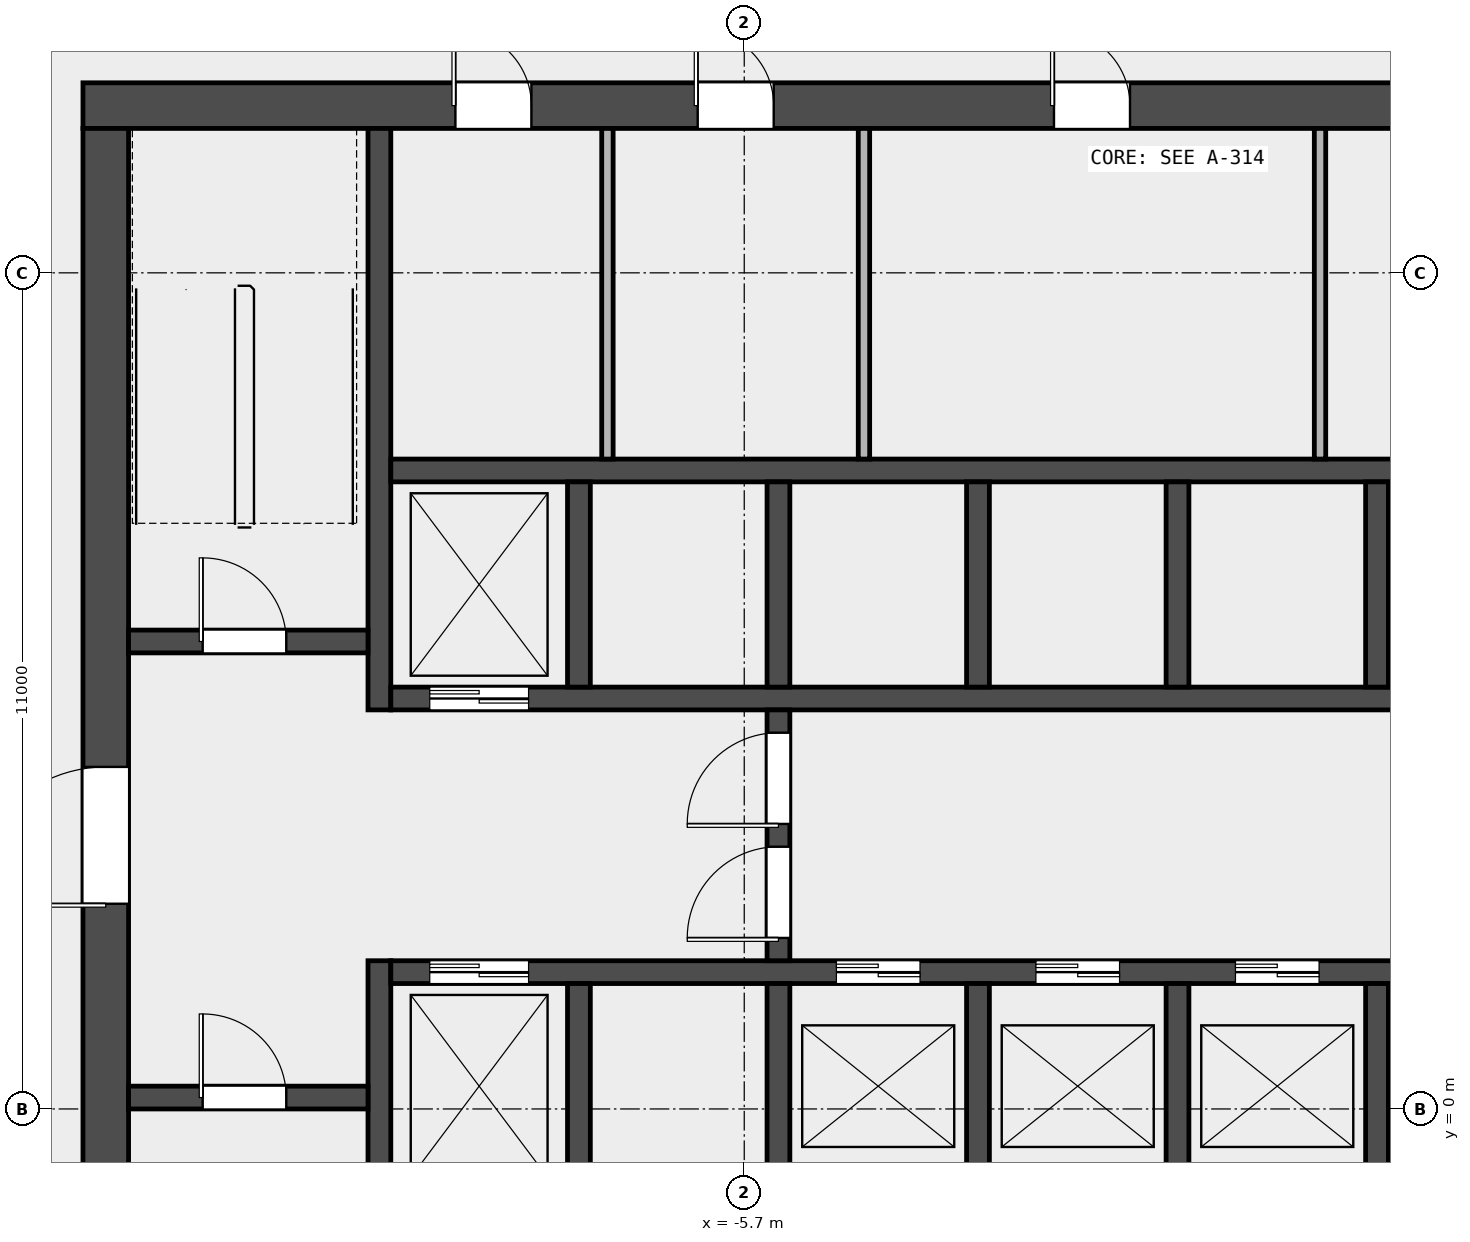
"""IFC4 building model, lengths in metres.
Left out: names, types, materials, properties, quantities, classifications, styles, units other than length and angle.
Written with IfcOpenShell. Run it as: python <this file> out.ifc"""

import sys

from ifc_helpers import new_model, si_unit, direction, frame, frame_2d, origin, place, context, subcontext, project, spatial, rectangle, extrude, element, fill, save


model = new_model("IFC4")
c1 = context("Model", 3, precision=1e-05, world=origin(), true_north=direction((0.0, 1.0)))
c2 = subcontext(c1, "Body", "Model", "MODEL_VIEW")
j1 = project(units=[si_unit("LENGTHUNIT", "METRE"), si_unit("PLANEANGLEUNIT", "RADIAN")], contexts=[c1])
p1 = place(None, origin())
s1 = spatial("IfcSite", under=j1, at=p1, CompositionType="ELEMENT")
p2 = place(p1, origin())
s2 = spatial("IfcBuilding", under=s1, at=p2, CompositionType="ELEMENT")
p3 = place(p2, frame((0.0, 0.0, 157.0)))
s3 = spatial("IfcBuildingStorey", under=s2, at=p3, CompositionType="ELEMENT", Elevation=157.0)
p4 = place(p3, frame((-14.4, 13.2, 0.0), z_axis=(0.0, 0.0, 1.0), x_axis=(1.0, 0.0, 0.0)))
e1 = element("IfcWall", 1, at=p4, inside=s3, PredefinedType="SHEAR", context=c2, shape_type="SweptSolid", body=[
    extrude(rectangle(XDim=28.8, YDim=0.6, at=frame_2d((14.4, 0.0))), origin(), (0.0, 0.0, 1.0), 3.7),
])
p5 = place(p4, frame((4.9, 0.0, 0.0)))
e2 = element("IfcOpeningElement", 2, at=p5, cuts=e1, PredefinedType="OPENING", context=c2, shape_type="SweptSolid", body=[
    extrude(rectangle(XDim=1.0, YDim=2.1, at=frame_2d((0.5, 1.05))), frame((0.0, 0.312, 0.0), z_axis=(0.0, -1.0, 0.0), x_axis=(1.0, 0.0, 0.0)), (0.0, 0.0, 1.0), 0.624),
])
p6 = place(p4, frame((8.087, 0.0, 0.0)))
e3 = element("IfcOpeningElement", 3, at=p6, cuts=e1, PredefinedType="OPENING", context=c2, shape_type="SweptSolid", body=[
    extrude(rectangle(XDim=1.0, YDim=2.1, at=frame_2d((0.5, 1.05))), frame((0.0, 0.312, 0.0), z_axis=(0.0, -1.0, 0.0), x_axis=(1.0, 0.0, 0.0)), (0.0, 0.0, 1.0), 0.624),
])
p7 = place(p4, frame((12.775, 0.0, 0.0)))
e4 = element("IfcOpeningElement", 4, at=p7, cuts=e1, PredefinedType="OPENING", context=c2, shape_type="SweptSolid", body=[
    extrude(rectangle(XDim=1.0, YDim=2.1, at=frame_2d((0.5, 1.05))), frame((0.0, 0.312, 0.0), z_axis=(0.0, -1.0, 0.0), x_axis=(1.0, 0.0, 0.0)), (0.0, 0.0, 1.0), 0.624),
])
p8 = place(p4, frame((17.65, 0.0, 0.0)))
e5 = element("IfcOpeningElement", 5, at=p8, cuts=e1, PredefinedType="OPENING", context=c2, shape_type="SweptSolid", body=[
    extrude(rectangle(XDim=1.0, YDim=2.1, at=frame_2d((0.5, 1.05))), frame((0.0, 0.312, 0.0), z_axis=(0.0, -1.0, 0.0), x_axis=(1.0, 0.0, 0.0)), (0.0, 0.0, 1.0), 0.624),
])
p9 = place(p4, frame((21.962, 0.0, 0.0)))
e6 = element("IfcOpeningElement", 6, at=p9, cuts=e1, PredefinedType="OPENING", context=c2, shape_type="SweptSolid", body=[
    extrude(rectangle(XDim=1.0, YDim=2.1, at=frame_2d((0.5, 1.05))), frame((0.0, 0.312, 0.0), z_axis=(0.0, -1.0, 0.0), x_axis=(1.0, 0.0, 0.0)), (0.0, 0.0, 1.0), 0.624),
])
p10 = place(p3, frame((-14.1, -6.6, 0.0), z_axis=(0.0, 0.0, 1.0), x_axis=(0.0, 1.0, 0.0)))
e7 = element("IfcWall", 7, at=p10, inside=s3, PredefinedType="SHEAR", context=c2, shape_type="SweptSolid", body=[
    extrude(rectangle(XDim=19.5, YDim=0.6, at=frame_2d((9.75, 0.0))), origin(), (0.0, 0.0, 1.0), 3.7),
])
p11 = place(p10, frame((9.3, 0.0, 0.0)))
e8 = element("IfcOpeningElement", 8, at=p11, cuts=e7, PredefinedType="OPENING", context=c2, shape_type="SweptSolid", body=[
    extrude(rectangle(XDim=1.8, YDim=2.1, at=frame_2d((0.9, 1.05))), frame((0.0, 0.312, 0.0), z_axis=(0.0, -1.0, 0.0), x_axis=(1.0, 0.0, 0.0)), (0.0, 0.0, 1.0), 0.624),
])
p12 = place(p3, frame((-10.5, -6.6, 0.0), z_axis=(0.0, 0.0, 1.0), x_axis=(0.0, 1.0, 0.0)))
e9 = element("IfcWall", 9, at=p12, inside=s3, PredefinedType="SHEAR", context=c2, shape_type="SweptSolid", body=[
    extrude(rectangle(XDim=8.55, YDim=0.3, at=frame_2d((4.275, 0.0))), origin(), (0.0, 0.0, 1.0), 3.7),
])
p13 = place(p3, frame((-10.5, 5.25, 0.0), z_axis=(0.0, 0.0, 1.0), x_axis=(0.0, 1.0, 0.0)))
e10 = element("IfcWall", 10, at=p13, inside=s3, PredefinedType="SHEAR", context=c2, shape_type="SweptSolid", body=[
    extrude(rectangle(XDim=7.65, YDim=0.3, at=frame_2d((3.825, 0.0))), origin(), (0.0, 0.0, 1.0), 3.7),
])
p14 = place(p3, frame((-13.8, 0.15, 0.0), z_axis=(0.0, 0.0, 1.0), x_axis=(1.0, 0.0, 0.0)))
e11 = element("IfcWall", 11, at=p14, inside=s3, PredefinedType="SOLIDWALL", context=c2, shape_type="SweptSolid", body=[
    extrude(rectangle(XDim=3.15, YDim=0.3, at=frame_2d((1.575, 0.0))), origin(), (0.0, 0.0, 1.0), 3.7),
])
p15 = place(p14, frame((0.975, 0.0, 0.0)))
e12 = element("IfcOpeningElement", 12, at=p15, cuts=e11, PredefinedType="OPENING", context=c2, shape_type="SweptSolid", body=[
    extrude(rectangle(XDim=1.1, YDim=2.1, at=frame_2d((0.55, 1.05))), frame((0.0, 0.162, 0.0), z_axis=(0.0, -1.0, 0.0), x_axis=(1.0, 0.0, 0.0)), (0.0, 0.0, 1.0), 0.324),
])
p16 = place(p3, frame((-13.8, 6.15, 0.0), z_axis=(0.0, 0.0, 1.0), x_axis=(1.0, 0.0, 0.0)))
e13 = element("IfcWall", 13, at=p16, inside=s3, PredefinedType="SOLIDWALL", context=c2, shape_type="SweptSolid", body=[
    extrude(rectangle(XDim=3.15, YDim=0.3, at=frame_2d((1.575, 0.0))), origin(), (0.0, 0.0, 1.0), 3.7),
])
p17 = place(p16, frame((0.975, 0.0, 0.0)))
e14 = element("IfcOpeningElement", 14, at=p17, cuts=e13, PredefinedType="OPENING", context=c2, shape_type="SweptSolid", body=[
    extrude(rectangle(XDim=1.1, YDim=2.1, at=frame_2d((0.55, 1.05))), frame((0.0, 0.162, 0.0), z_axis=(0.0, -1.0, 0.0), x_axis=(1.0, 0.0, 0.0)), (0.0, 0.0, 1.0), 0.324),
])
p18 = place(p3, frame((-10.35, 1.8, 0.0), z_axis=(0.0, 0.0, 1.0), x_axis=(1.0, 0.0, 0.0)))
e15 = element("IfcWall", 15, at=p18, inside=s3, PredefinedType="SOLIDWALL", context=c2, shape_type="SweptSolid", body=[
    extrude(rectangle(XDim=20.7, YDim=0.3, at=frame_2d((10.35, 0.0))), origin(), (0.0, 0.0, 1.0), 3.7),
])
p19 = place(p18, frame((0.512, 0.0, 0.0)))
e16 = element("IfcOpeningElement", 16, at=p19, cuts=e15, PredefinedType="OPENING", context=c2, shape_type="SweptSolid", body=[
    extrude(rectangle(XDim=1.3, YDim=2.1, at=frame_2d((0.65, 1.05))), frame((0.0, 0.162, 0.0), z_axis=(0.0, -1.0, 0.0), x_axis=(1.0, 0.0, 0.0)), (0.0, 0.0, 1.0), 0.324),
])
p20 = place(p18, frame((5.863, 0.0, 0.0)))
e17 = element("IfcOpeningElement", 17, at=p20, cuts=e15, PredefinedType="OPENING", context=c2, shape_type="SweptSolid", body=[
    extrude(rectangle(XDim=1.1, YDim=2.1, at=frame_2d((0.55, 1.05))), frame((0.0, 0.162, 0.0), z_axis=(0.0, -1.0, 0.0), x_axis=(1.0, 0.0, 0.0)), (0.0, 0.0, 1.0), 0.324),
])
p21 = place(p18, frame((8.488, 0.0, 0.0)))
e18 = element("IfcOpeningElement", 18, at=p21, cuts=e15, PredefinedType="OPENING", context=c2, shape_type="SweptSolid", body=[
    extrude(rectangle(XDim=1.1, YDim=2.1, at=frame_2d((0.55, 1.05))), frame((0.0, 0.162, 0.0), z_axis=(0.0, -1.0, 0.0), x_axis=(1.0, 0.0, 0.0)), (0.0, 0.0, 1.0), 0.324),
])
p22 = place(p18, frame((11.113, 0.0, 0.0)))
e19 = element("IfcOpeningElement", 19, at=p22, cuts=e15, PredefinedType="OPENING", context=c2, shape_type="SweptSolid", body=[
    extrude(rectangle(XDim=1.1, YDim=2.1, at=frame_2d((0.55, 1.05))), frame((0.0, 0.162, 0.0), z_axis=(0.0, -1.0, 0.0), x_axis=(1.0, 0.0, 0.0)), (0.0, 0.0, 1.0), 0.324),
])
p23 = place(p18, frame((13.738, 0.0, 0.0)))
e20 = element("IfcOpeningElement", 20, at=p23, cuts=e15, PredefinedType="OPENING", context=c2, shape_type="SweptSolid", body=[
    extrude(rectangle(XDim=1.1, YDim=2.1, at=frame_2d((0.55, 1.05))), frame((0.0, 0.162, 0.0), z_axis=(0.0, -1.0, 0.0), x_axis=(1.0, 0.0, 0.0)), (0.0, 0.0, 1.0), 0.324),
])
p24 = place(p18, frame((16.363, 0.0, 0.0)))
e21 = element("IfcOpeningElement", 21, at=p24, cuts=e15, PredefinedType="OPENING", context=c2, shape_type="SweptSolid", body=[
    extrude(rectangle(XDim=1.1, YDim=2.1, at=frame_2d((0.55, 1.05))), frame((0.0, 0.162, 0.0), z_axis=(0.0, -1.0, 0.0), x_axis=(1.0, 0.0, 0.0)), (0.0, 0.0, 1.0), 0.324),
])
p25 = place(p18, frame((18.988, 0.0, 0.0)))
e22 = element("IfcOpeningElement", 22, at=p25, cuts=e15, PredefinedType="OPENING", context=c2, shape_type="SweptSolid", body=[
    extrude(rectangle(XDim=1.1, YDim=2.1, at=frame_2d((0.55, 1.05))), frame((0.0, 0.162, 0.0), z_axis=(0.0, -1.0, 0.0), x_axis=(1.0, 0.0, 0.0)), (0.0, 0.0, 1.0), 0.324),
])
p26 = place(p3, frame((-10.35, 5.4, 0.0), z_axis=(0.0, 0.0, 1.0), x_axis=(1.0, 0.0, 0.0)))
e23 = element("IfcWall", 23, at=p26, inside=s3, PredefinedType="SOLIDWALL", context=c2, shape_type="SweptSolid", body=[
    extrude(rectangle(XDim=20.7, YDim=0.3, at=frame_2d((10.35, 0.0))), origin(), (0.0, 0.0, 1.0), 3.7),
])
p27 = place(p26, frame((0.512, 0.0, 0.0)))
e24 = element("IfcOpeningElement", 24, at=p27, cuts=e23, PredefinedType="OPENING", context=c2, shape_type="SweptSolid", body=[
    extrude(rectangle(XDim=1.3, YDim=2.1, at=frame_2d((0.65, 1.05))), frame((0.0, 0.162, 0.0), z_axis=(0.0, -1.0, 0.0), x_axis=(1.0, 0.0, 0.0)), (0.0, 0.0, 1.0), 0.324),
])
p28 = place(p3, frame((-10.35, 8.4, 0.0), z_axis=(0.0, 0.0, 1.0), x_axis=(1.0, 0.0, 0.0)))
e25 = element("IfcWall", 25, at=p28, inside=s3, PredefinedType="SOLIDWALL", context=c2, shape_type="SweptSolid", body=[
    extrude(rectangle(XDim=20.7, YDim=0.3, at=frame_2d((10.35, 0.0))), origin(), (0.0, 0.0, 1.0), 3.7),
])
for number, where, z_axis, x_axis in (
    (26, (-7.875, -1.05, 0.0), (0.0, 0.0, 1.0), (0.0, 1.0, 0.0)),
    (27, (-5.25, -1.05, 0.0), (0.0, 0.0, 1.0), (0.0, 1.0, 0.0)),
    (28, (-2.625, -1.05, 0.0), (0.0, 0.0, 1.0), (0.0, 1.0, 0.0)),
    (29, (0.0, -1.05, 0.0), (0.0, 0.0, 1.0), (0.0, 1.0, 0.0)),
    (30, (2.625, -1.05, 0.0), (0.0, 0.0, 1.0), (0.0, 1.0, 0.0)),
    (31, (-7.875, 5.55, 0.0), (0.0, 0.0, 1.0), (0.0, 1.0, 0.0)),
    (32, (-5.25, 5.55, 0.0), (0.0, 0.0, 1.0), (0.0, 1.0, 0.0)),
    (33, (-2.625, 5.55, 0.0), (0.0, 0.0, 1.0), (0.0, 1.0, 0.0)),
    (34, (0.0, 5.55, 0.0), (0.0, 0.0, 1.0), (0.0, 1.0, 0.0)),
    (35, (2.625, 5.55, 0.0), (0.0, 0.0, 1.0), (0.0, 1.0, 0.0)),
):
    element("IfcWall", number, at=place(p3, frame(where, z_axis=z_axis, x_axis=x_axis)), inside=s3, PredefinedType="SOLIDWALL", context=c2, shape_type="SweptSolid", body=[
        extrude(rectangle(XDim=2.7, YDim=0.3, at=frame_2d((1.35, 0.0))), origin(), (0.0, 0.0, 1.0), 3.7),
    ])
p29 = place(p3, frame((-5.25, 1.95, 0.0), z_axis=(0.0, 0.0, 1.0), x_axis=(0.0, 1.0, 0.0)))
e36 = element("IfcWall", 36, at=p29, inside=s3, PredefinedType="SOLIDWALL", context=c2, shape_type="SweptSolid", body=[
    extrude(rectangle(XDim=3.3, YDim=0.3, at=frame_2d((1.65, 0.0))), origin(), (0.0, 0.0, 1.0), 3.7),
])
p30 = place(p29, frame((0.3, 0.0, 0.0)))
e37 = element("IfcOpeningElement", 37, at=p30, cuts=e36, PredefinedType="OPENING", context=c2, shape_type="SweptSolid", body=[
    extrude(rectangle(XDim=1.2, YDim=2.1, at=frame_2d((0.6, 1.05))), frame((0.0, 0.162, 0.0), z_axis=(0.0, -1.0, 0.0), x_axis=(1.0, 0.0, 0.0)), (0.0, 0.0, 1.0), 0.324),
])
p31 = place(p29, frame((1.8, 0.0, 0.0)))
e38 = element("IfcOpeningElement", 38, at=p31, cuts=e36, PredefinedType="OPENING", context=c2, shape_type="SweptSolid", body=[
    extrude(rectangle(XDim=1.2, YDim=2.1, at=frame_2d((0.6, 1.05))), frame((0.0, 0.162, 0.0), z_axis=(0.0, -1.0, 0.0), x_axis=(1.0, 0.0, 0.0)), (0.0, 0.0, 1.0), 0.324),
])
for number, where, z_axis, x_axis in (
    (39, (-7.5, 8.55, 0.0), (0.0, 0.0, 1.0), (0.0, 1.0, 0.0)),
    (40, (-4.125, 8.55, 0.0), (0.0, 0.0, 1.0), (0.0, 1.0, 0.0)),
    (41, (1.875, 8.55, 0.0), (0.0, 0.0, 1.0), (0.0, 1.0, 0.0)),
):
    element("IfcWall", number, at=place(p3, frame(where, z_axis=z_axis, x_axis=x_axis)), inside=s3, PredefinedType="PARTITIONING", context=c2, shape_type="SweptSolid", body=[
        extrude(rectangle(XDim=4.35, YDim=0.15, at=frame_2d((2.175, 0.0))), origin(), (0.0, 0.0, 1.0), 3.7),
    ])
p32 = place(p15, origin())
e42 = element("IfcDoor", 42, at=p32, inside=s3, OperationType="SINGLE_SWING_LEFT", PredefinedType="DOOR", context=c2, shape_type="SweptSolid", body=[
    extrude(rectangle(XDim=1.1, YDim=2.1, at=frame_2d((0.55, 1.05))), frame((0.0, 0.025, 0.0), z_axis=(0.0, -1.0, 0.0), x_axis=(1.0, 0.0, 0.0)), (0.0, 0.0, 1.0), 0.05),
])
fill(e12, e42)
p33 = place(p17, origin())
e43 = element("IfcDoor", 43, at=p33, inside=s3, OperationType="SINGLE_SWING_LEFT", PredefinedType="DOOR", context=c2, shape_type="SweptSolid", body=[
    extrude(rectangle(XDim=1.1, YDim=2.1, at=frame_2d((0.55, 1.05))), frame((0.0, 0.025, 0.0), z_axis=(0.0, -1.0, 0.0), x_axis=(1.0, 0.0, 0.0)), (0.0, 0.0, 1.0), 0.05),
])
fill(e14, e43)
p34 = place(p11, origin())
e44 = element("IfcDoor", 44, at=p34, inside=s3, OperationType="DOUBLE_DOOR_SINGLE_SWING", PredefinedType="DOOR", context=c2, shape_type="SweptSolid", body=[
    extrude(rectangle(XDim=1.8, YDim=2.1, at=frame_2d((0.9, 1.05))), frame((0.0, 0.025, 0.0), z_axis=(0.0, -1.0, 0.0), x_axis=(1.0, 0.0, 0.0)), (0.0, 0.0, 1.0), 0.05),
])
fill(e8, e44)
p35 = place(p30, origin())
e45 = element("IfcDoor", 45, at=p35, inside=s3, OperationType="SINGLE_SWING_LEFT", PredefinedType="DOOR", context=c2, shape_type="SweptSolid", body=[
    extrude(rectangle(XDim=1.2, YDim=2.1, at=frame_2d((0.6, 1.05))), frame((0.0, 0.025, 0.0), z_axis=(0.0, -1.0, 0.0), x_axis=(1.0, 0.0, 0.0)), (0.0, 0.0, 1.0), 0.05),
])
fill(e37, e45)
p36 = place(p31, origin())
e46 = element("IfcDoor", 46, at=p36, inside=s3, OperationType="SINGLE_SWING_RIGHT", PredefinedType="DOOR", context=c2, shape_type="SweptSolid", body=[
    extrude(rectangle(XDim=1.2, YDim=2.1, at=frame_2d((0.6, 1.05))), frame((0.0, 0.025, 0.0), z_axis=(0.0, -1.0, 0.0), x_axis=(1.0, 0.0, 0.0)), (0.0, 0.0, 1.0), 0.05),
])
fill(e38, e46)
p37 = place(p19, origin())
e47 = element("IfcDoor", 47, at=p37, inside=s3, OperationType="DOUBLE_DOOR_SLIDING", PredefinedType="DOOR", context=c2, shape_type="SweptSolid", body=[
    extrude(rectangle(XDim=1.3, YDim=2.1, at=frame_2d((0.65, 1.05))), frame((0.0, 0.025, 0.0), z_axis=(0.0, -1.0, 0.0), x_axis=(1.0, 0.0, 0.0)), (0.0, 0.0, 1.0), 0.05),
])
fill(e16, e47)
p38 = place(p20, origin())
e48 = element("IfcDoor", 48, at=p38, inside=s3, OperationType="DOUBLE_DOOR_SLIDING", PredefinedType="DOOR", context=c2, shape_type="SweptSolid", body=[
    extrude(rectangle(XDim=1.1, YDim=2.1, at=frame_2d((0.55, 1.05))), frame((0.0, 0.025, 0.0), z_axis=(0.0, -1.0, 0.0), x_axis=(1.0, 0.0, 0.0)), (0.0, 0.0, 1.0), 0.05),
])
fill(e17, e48)
p39 = place(p21, origin())
e49 = element("IfcDoor", 49, at=p39, inside=s3, OperationType="DOUBLE_DOOR_SLIDING", PredefinedType="DOOR", context=c2, shape_type="SweptSolid", body=[
    extrude(rectangle(XDim=1.1, YDim=2.1, at=frame_2d((0.55, 1.05))), frame((0.0, 0.025, 0.0), z_axis=(0.0, -1.0, 0.0), x_axis=(1.0, 0.0, 0.0)), (0.0, 0.0, 1.0), 0.05),
])
fill(e18, e49)
p40 = place(p22, origin())
e50 = element("IfcDoor", 50, at=p40, inside=s3, OperationType="DOUBLE_DOOR_SLIDING", PredefinedType="DOOR", context=c2, shape_type="SweptSolid", body=[
    extrude(rectangle(XDim=1.1, YDim=2.1, at=frame_2d((0.55, 1.05))), frame((0.0, 0.025, 0.0), z_axis=(0.0, -1.0, 0.0), x_axis=(1.0, 0.0, 0.0)), (0.0, 0.0, 1.0), 0.05),
])
fill(e19, e50)
p41 = place(p27, origin())
e51 = element("IfcDoor", 51, at=p41, inside=s3, OperationType="DOUBLE_DOOR_SLIDING", PredefinedType="DOOR", context=c2, shape_type="SweptSolid", body=[
    extrude(rectangle(XDim=1.3, YDim=2.1, at=frame_2d((0.65, 1.05))), frame((0.0, 0.025, 0.0), z_axis=(0.0, -1.0, 0.0), x_axis=(1.0, 0.0, 0.0)), (0.0, 0.0, 1.0), 0.05),
])
fill(e24, e51)
p42 = place(p5, origin())
e52 = element("IfcDoor", 52, at=p42, inside=s3, OperationType="SINGLE_SWING_LEFT", PredefinedType="DOOR", context=c2, shape_type="SweptSolid", body=[
    extrude(rectangle(XDim=1.0, YDim=2.1, at=frame_2d((0.5, 1.05))), frame((0.0, 0.025, 0.0), z_axis=(0.0, -1.0, 0.0), x_axis=(1.0, 0.0, 0.0)), (0.0, 0.0, 1.0), 0.05),
])
fill(e2, e52)
p43 = place(p6, origin())
e53 = element("IfcDoor", 53, at=p43, inside=s3, OperationType="SINGLE_SWING_LEFT", PredefinedType="DOOR", context=c2, shape_type="SweptSolid", body=[
    extrude(rectangle(XDim=1.0, YDim=2.1, at=frame_2d((0.5, 1.05))), frame((0.0, 0.025, 0.0), z_axis=(0.0, -1.0, 0.0), x_axis=(1.0, 0.0, 0.0)), (0.0, 0.0, 1.0), 0.05),
])
fill(e3, e53)
p44 = place(p7, origin())
e54 = element("IfcDoor", 54, at=p44, inside=s3, OperationType="SINGLE_SWING_LEFT", PredefinedType="DOOR", context=c2, shape_type="SweptSolid", body=[
    extrude(rectangle(XDim=1.0, YDim=2.1, at=frame_2d((0.5, 1.05))), frame((0.0, 0.025, 0.0), z_axis=(0.0, -1.0, 0.0), x_axis=(1.0, 0.0, 0.0)), (0.0, 0.0, 1.0), 0.05),
])
fill(e4, e54)
save(model, sys.argv[1])
